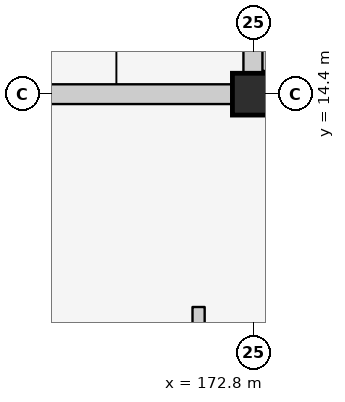
"""IFC4 building model, lengths in metres.
Left out: names, types, materials, properties, quantities, classifications, styles, units other than length and angle.
Written with IfcOpenShell. Run it as: python <this file> out.ifc"""

import sys

from ifc_helpers import new_model, si_unit, direction, frame, frame_2d, origin, origin_2d, place, context, subcontext, project, spatial, rectangle, extrude, element, save


model = new_model("IFC4")
c1 = context("Model", 3, precision=1e-05, world=origin(), true_north=direction((0.0, 1.0)))
c2 = subcontext(c1, "Body", "Model", "MODEL_VIEW")
j1 = project(units=[si_unit("LENGTHUNIT", "METRE"), si_unit("PLANEANGLEUNIT", "RADIAN")], contexts=[c1])
p1 = place(None, origin())
s1 = spatial("IfcSite", under=j1, at=p1, CompositionType="ELEMENT")
p2 = place(p1, origin())
s2 = spatial("IfcBuilding", under=s1, at=p2, CompositionType="ELEMENT")
p3 = place(p2, frame((0.0, 0.0, 28.3)))
s3 = spatial("IfcBuildingStorey", under=s2, at=p3, CompositionType="ELEMENT", Elevation=28.3)
p4 = place(p3, frame((172.8, 14.4, 0.0), z_axis=(0.0, 0.0, 1.0), x_axis=(1.0, 0.0, 0.0)))
e1 = element("IfcColumn", 1, at=p4, inside=s3, PredefinedType="COLUMN", context=c2, shape_type="SweptSolid", body=[
    extrude(rectangle(XDim=0.55, YDim=0.55, at=origin_2d()), origin(), (0.0, 0.0, 1.0), 3.2),
])
p5 = place(p3, frame((165.875, 14.4, 0.0), z_axis=(0.0, 0.0, 1.0), x_axis=(1.0, 0.0, 0.0)))
e2 = element("IfcWall", 2, at=p5, inside=s3, PredefinedType="ELEMENTEDWALL", context=c2, shape_type="SweptSolid", body=[
    extrude(rectangle(XDim=6.65, YDim=0.26, at=frame_2d((3.325, 0.0))), origin(), (0.0, 0.0, 1.0), 2.335),
])
p6 = place(p5, frame((2.825, 0.0, 1.2)))
e3 = element("IfcOpeningElement", 3, at=p6, cuts=e2, PredefinedType="OPENING", context=c2, shape_type="SweptSolid", body=[
    extrude(rectangle(XDim=1.0, YDim=0.9, at=frame_2d((0.5, 0.45))), frame((0.0, 0.145, 0.0), z_axis=(0.0, -1.0, 0.0), x_axis=(1.0, 0.0, 0.0)), (0.0, 0.0, 1.0), 0.29),
])
p7 = place(p3, frame((172.8, 14.675, 0.0), z_axis=(0.0, 0.0, 1.0), x_axis=(0.0, 1.0, 0.0)))
e4 = element("IfcWall", 4, at=p7, inside=s3, PredefinedType="ELEMENTEDWALL", context=c2, shape_type="SweptSolid", body=[
    extrude(rectangle(XDim=6.65, YDim=0.26, at=frame_2d((3.325, 0.0))), origin(), (0.0, 0.0, 1.0), 2.435),
])
p8 = place(p7, frame((2.5, 0.0, 0.0)))
e5 = element("IfcOpeningElement", 5, at=p8, cuts=e4, PredefinedType="OPENING", context=c2, shape_type="SweptSolid", body=[
    extrude(rectangle(XDim=1.4, YDim=2.1, at=frame_2d((0.7, 1.05))), frame((0.0, 0.145, 0.0), z_axis=(0.0, -1.0, 0.0), x_axis=(1.0, 0.0, 0.0)), (0.0, 0.0, 1.0), 0.29),
])
p9 = place(p3, frame((172.08, 7.28, 0.0), z_axis=(0.0, 0.0, 1.0), x_axis=(0.0, 1.0, 0.0)))
e6 = element("IfcWall", 6, at=p9, inside=s3, PredefinedType="PARTITIONING", context=c2, shape_type="SweptSolid", body=[
    extrude(rectangle(XDim=4.32, YDim=0.16, at=frame_2d((2.16, 0.0))), origin(), (0.0, 0.0, 1.0), 2.95),
])
p10 = place(p9, frame((0.72, 0.0, 0.0)))
e7 = element("IfcOpeningElement", 7, at=p10, cuts=e6, PredefinedType="OPENING", context=c2, shape_type="SweptSolid", body=[
    extrude(rectangle(XDim=1.2, YDim=2.2, at=frame_2d((0.6, 1.1))), frame((0.0, 0.095, 0.0), z_axis=(0.0, -1.0, 0.0), x_axis=(1.0, 0.0, 0.0)), (0.0, 0.0, 1.0), 0.19),
])
p11 = place(p3, frame((173.0, 14.705, 0.0), z_axis=(0.0, 0.0, 1.0), x_axis=(0.0, 1.0, 0.0)))
e8 = element("IfcWall", 8, at=p11, inside=s3, PredefinedType="PARTITIONING", context=c2, shape_type="SweptSolid", body=[
    extrude(rectangle(XDim=6.59, YDim=0.16, at=frame_2d((3.295, 0.0))), origin(), (0.0, 0.0, 1.0), 2.95),
])
p12 = place(p11, frame((2.785, 0.0, 0.0)))
e9 = element("IfcOpeningElement", 9, at=p12, cuts=e8, PredefinedType="OPENING", context=c2, shape_type="SweptSolid", body=[
    extrude(rectangle(XDim=1.02, YDim=2.18, at=frame_2d((0.51, 1.09))), frame((0.0, 0.095, 0.0), z_axis=(0.0, -1.0, 0.0), x_axis=(1.0, 0.0, 0.0)), (0.0, 0.0, 1.0), 0.19),
])
save(model, sys.argv[1])
